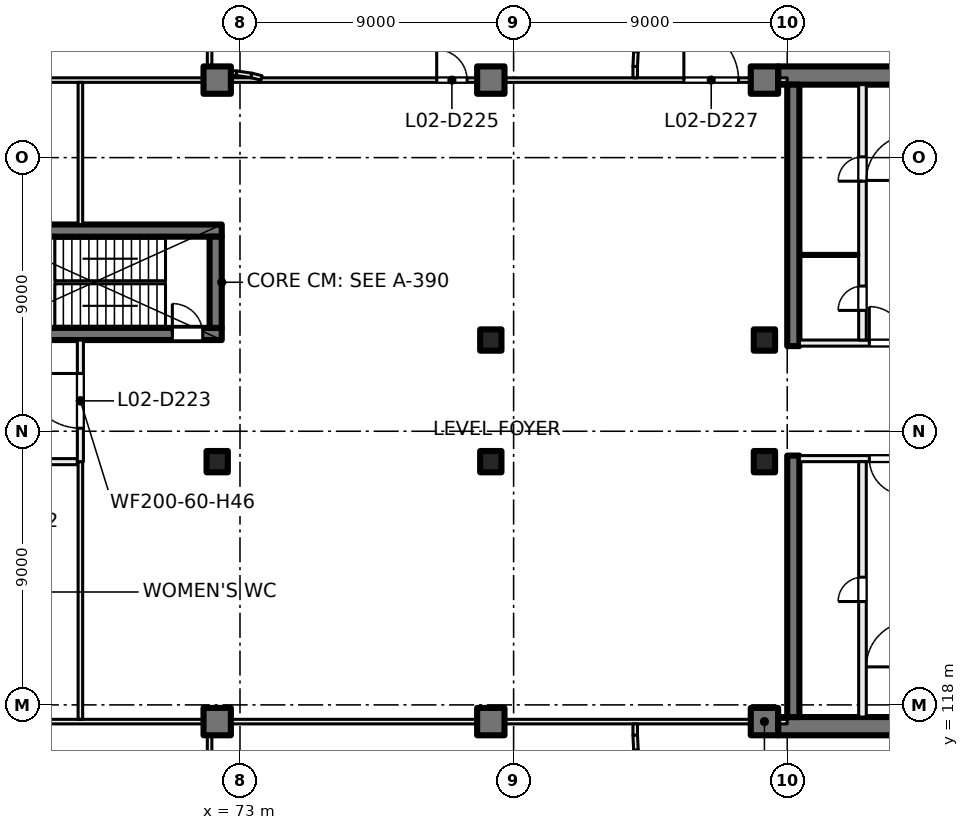
"""IFC4 building model, lengths in metres.
Left out: names, types, materials, properties, quantities, classifications, styles, units other than length and angle.
Written with IfcOpenShell. Run it as: python <this file> out.ifc"""

import sys

from ifc_helpers import new_model, si_unit, direction, frame, frame_2d, origin, origin_2d, place, context, subcontext, project, spatial, rectangle, extrude, element, fill, save


model = new_model("IFC4")
c1 = context("Model", 3, precision=1e-05, world=origin(), true_north=direction((0.0, 1.0)))
c2 = subcontext(c1, "Body", "Model", "MODEL_VIEW")
j1 = project(units=[si_unit("LENGTHUNIT", "METRE"), si_unit("PLANEANGLEUNIT", "RADIAN")], contexts=[c1])
p1 = place(None, origin())
s1 = spatial("IfcSite", under=j1, at=p1, CompositionType="ELEMENT")
p2 = place(p1, origin())
s2 = spatial("IfcBuilding", under=s1, at=p2, CompositionType="ELEMENT")
p3 = place(p2, frame((0.0, 0.0, 12.5)))
s3 = spatial("IfcBuildingStorey", under=s2, at=p3, CompositionType="ELEMENT", Elevation=12.5)
for number, where, z_axis, x_axis in (
    (1, (81.25, 130.0, 0.0), (0.0, 0.0, 1.0), (1.0, 0.0, 0.0)),
    (2, (90.25, 130.0, 0.0), (0.0, 0.0, 1.0), (1.0, 0.0, 0.0)),
    (3, (72.25, 126.0, 0.0), (0.0, 0.0, 1.0), (1.0, 0.0, 0.0)),
    (4, (81.25, 126.0, 0.0), (0.0, 0.0, 1.0), (1.0, 0.0, 0.0)),
    (5, (90.25, 126.0, 0.0), (0.0, 0.0, 1.0), (1.0, 0.0, 0.0)),
):
    element("IfcColumn", number, at=place(p3, frame(where, z_axis=z_axis, x_axis=x_axis)), inside=s3, PredefinedType="COLUMN", context=c2, shape_type="SweptSolid", body=[
        extrude(rectangle(XDim=0.7, YDim=0.7, at=origin_2d()), origin(), (0.0, 0.0, 1.0), 5.0),
    ])
for number, where, z_axis, x_axis in (
    (6, (72.25, 138.55, 0.0), (0.0, 0.0, 1.0), (1.0, 0.0, 0.0)),
    (7, (81.25, 138.55, 0.0), (0.0, 0.0, 1.0), (1.0, 0.0, 0.0)),
    (8, (90.25, 138.55, 0.0), (0.0, 0.0, 1.0), (1.0, 0.0, 0.0)),
    (9, (72.25, 117.45, 0.0), (0.0, 0.0, 1.0), (1.0, 0.0, 0.0)),
    (10, (81.25, 117.45, 0.0), (0.0, 0.0, 1.0), (1.0, 0.0, 0.0)),
    (11, (90.25, 117.45, 0.0), (0.0, 0.0, 1.0), (1.0, 0.0, 0.0)),
):
    element("IfcColumn", number, at=place(p3, frame(where, z_axis=z_axis, x_axis=x_axis)), inside=s3, PredefinedType="COLUMN", context=c2, shape_type="SweptSolid", body=[
        extrude(rectangle(XDim=0.9, YDim=0.9, at=origin_2d()), origin(), (0.0, 0.0, 1.0), 5.0),
    ])
for number, where, z_axis, x_axis in (
    (12, (99.6, 138.7, 0.0), (0.0, 0.0, 1.0), (-1.0, 0.0, 0.0)),
    (13, (99.6, 117.3, 0.0), (0.0, 0.0, 1.0), (-1.0, 0.0, 0.0)),
):
    element("IfcWall", number, at=place(p3, frame(where, z_axis=z_axis, x_axis=x_axis)), inside=s3, PredefinedType="SHEAR", context=c2, shape_type="SweptSolid", body=[
        extrude(rectangle(XDim=8.9, YDim=0.6, at=frame_2d((4.45, 0.0))), origin(), (0.0, 0.0, 1.0), 5.0),
    ])
for number, where, z_axis, x_axis in (
    (14, (91.2, 138.4, 0.0), (0.0, 0.0, 1.0), (0.0, -1.0, 0.0)),
    (15, (91.2, 126.2, 0.0), (0.0, 0.0, 1.0), (0.0, -1.0, 0.0)),
):
    element("IfcWall", number, at=place(p3, frame(where, z_axis=z_axis, x_axis=x_axis)), inside=s3, PredefinedType="SHEAR", context=c2, shape_type="SweptSolid", body=[
        extrude(rectangle(XDim=8.6, YDim=0.4, at=frame_2d((4.3, 0.0))), origin(), (0.0, 0.0, 1.0), 5.0),
    ])
p4 = place(p3, frame((63.6, 130.2, 0.0), z_axis=(0.0, 0.0, 1.0), x_axis=(1.0, 0.0, 0.0)))
e16 = element("IfcWall", 16, at=p4, inside=s3, PredefinedType="SHEAR", context=c2, shape_type="SweptSolid", body=[
    extrude(rectangle(XDim=8.8, YDim=0.4, at=frame_2d((4.4, 0.0))), origin(), (0.0, 0.0, 1.0), 5.0),
])
p5 = place(p4, frame((7.175, 0.0, 0.0)))
e17 = element("IfcOpeningElement", 17, at=p5, cuts=e16, PredefinedType="OPENING", context=c2, shape_type="SweptSolid", body=[
    extrude(rectangle(XDim=1.0, YDim=2.1, at=frame_2d((0.5, 1.05))), frame((0.0, 0.21, 0.0), z_axis=(0.0, -1.0, 0.0), x_axis=(1.0, 0.0, 0.0)), (0.0, 0.0, 1.0), 0.42),
])
p6 = place(p3, frame((64.0, 133.6, 0.0), z_axis=(0.0, 0.0, 1.0), x_axis=(1.0, 0.0, 0.0)))
e18 = element("IfcWall", 18, at=p6, inside=s3, PredefinedType="SHEAR", context=c2, shape_type="SweptSolid", body=[
    extrude(rectangle(XDim=8.4, YDim=0.4, at=frame_2d((4.2, 0.0))), origin(), (0.0, 0.0, 1.0), 5.0),
])
p7 = place(p3, frame((72.2, 130.4, 0.0), z_axis=(0.0, 0.0, 1.0), x_axis=(0.0, 1.0, 0.0)))
e19 = element("IfcWall", 19, at=p7, inside=s3, PredefinedType="SHEAR", context=c2, shape_type="SweptSolid", body=[
    extrude(rectangle(XDim=3.0, YDim=0.4, at=frame_2d((1.5, 0.0))), origin(), (0.0, 0.0, 1.0), 5.0),
])
p8 = place(p3, frame((95.2, 126.1, 0.0), z_axis=(0.0, 0.0, 1.0), x_axis=(-1.0, 0.0, 0.0)))
e20 = element("IfcWall", 20, at=p8, inside=s3, PredefinedType="PARTITIONING", context=c2, shape_type="SweptSolid", body=[
    extrude(rectangle(XDim=3.8, YDim=0.2, at=frame_2d((1.9, 0.0))), origin(), (0.0, 0.0, 1.0), 4.6),
])
p9 = place(p8, frame((0.3, 0.0, 0.0)))
e21 = element("IfcOpeningElement", 21, at=p9, cuts=e20, PredefinedType="OPENING", context=c2, shape_type="SweptSolid", body=[
    extrude(rectangle(XDim=1.2, YDim=2.1, at=frame_2d((0.6, 1.05))), frame((0.0, 0.11, 0.0), z_axis=(0.0, -1.0, 0.0), x_axis=(1.0, 0.0, 0.0)), (0.0, 0.0, 1.0), 0.22),
])
p10 = place(p3, frame((93.475, 117.6, 0.0), z_axis=(0.0, 0.0, 1.0), x_axis=(0.0, 1.0, 0.0)))
e22 = element("IfcWall", 22, at=p10, inside=s3, PredefinedType="PARTITIONING", context=c2, shape_type="SweptSolid", body=[
    extrude(rectangle(XDim=8.4, YDim=0.25, at=frame_2d((4.2, 0.0))), origin(), (0.0, 0.0, 1.0), 4.6),
])
p11 = place(p10, frame((3.8, 0.0, 0.0)))
e23 = element("IfcOpeningElement", 23, at=p11, cuts=e22, PredefinedType="OPENING", context=c2, shape_type="SweptSolid", body=[
    extrude(rectangle(XDim=0.8, YDim=2.1, at=frame_2d((0.4, 1.05))), frame((0.0, 0.135, 0.0), z_axis=(0.0, -1.0, 0.0), x_axis=(1.0, 0.0, 0.0)), (0.0, 0.0, 1.0), 0.27),
])
p12 = place(p3, frame((91.4, 129.9, 0.0), z_axis=(0.0, 0.0, 1.0), x_axis=(1.0, 0.0, 0.0)))
e24 = element("IfcWall", 24, at=p12, inside=s3, PredefinedType="PARTITIONING", context=c2, shape_type="SweptSolid", body=[
    extrude(rectangle(XDim=3.8, YDim=0.2, at=frame_2d((1.9, 0.0))), origin(), (0.0, 0.0, 1.0), 4.6),
])
p13 = place(p12, frame((2.3, 0.0, 0.0)))
e25 = element("IfcOpeningElement", 25, at=p13, cuts=e24, PredefinedType="OPENING", context=c2, shape_type="SweptSolid", body=[
    extrude(rectangle(XDim=1.2, YDim=2.1, at=frame_2d((0.6, 1.05))), frame((0.0, 0.11, 0.0), z_axis=(0.0, -1.0, 0.0), x_axis=(1.0, 0.0, 0.0)), (0.0, 0.0, 1.0), 0.22),
])
p14 = place(p3, frame((93.475, 130.0, 0.0), z_axis=(0.0, 0.0, 1.0), x_axis=(0.0, 1.0, 0.0)))
e26 = element("IfcWall", 26, at=p14, inside=s3, PredefinedType="PARTITIONING", context=c2, shape_type="SweptSolid", body=[
    extrude(rectangle(XDim=8.4, YDim=0.25, at=frame_2d((4.2, 0.0))), origin(), (0.0, 0.0, 1.0), 4.6),
])
p15 = place(p14, frame((0.975, 0.0, 0.0)))
e27 = element("IfcOpeningElement", 27, at=p15, cuts=e26, PredefinedType="OPENING", context=c2, shape_type="SweptSolid", body=[
    extrude(rectangle(XDim=0.8, YDim=2.1, at=frame_2d((0.4, 1.05))), frame((0.0, 0.135, 0.0), z_axis=(0.0, -1.0, 0.0), x_axis=(1.0, 0.0, 0.0)), (0.0, 0.0, 1.0), 0.27),
])
p16 = place(p14, frame((5.225, 0.0, 0.0)))
e28 = element("IfcOpeningElement", 28, at=p16, cuts=e26, PredefinedType="OPENING", context=c2, shape_type="SweptSolid", body=[
    extrude(rectangle(XDim=0.8, YDim=2.1, at=frame_2d((0.4, 1.05))), frame((0.0, 0.135, 0.0), z_axis=(0.0, -1.0, 0.0), x_axis=(1.0, 0.0, 0.0)), (0.0, 0.0, 1.0), 0.27),
])
p17 = place(p3, frame((91.4, 132.8, 0.0), z_axis=(0.0, 0.0, 1.0), x_axis=(1.0, 0.0, 0.0)))
e29 = element("IfcWall", 29, at=p17, inside=s3, PredefinedType="PARTITIONING", context=c2, shape_type="SweptSolid", body=[
    extrude(rectangle(XDim=1.95, YDim=0.1, at=frame_2d((0.975, 0.0))), origin(), (0.0, 0.0, 1.0), 4.6),
])
p18 = place(p3, frame((49.825, 117.45, 0.0), z_axis=(0.0, 0.0, 1.0), x_axis=(1.0, 0.0, 0.0)))
e30 = element("IfcWall", 30, at=p18, inside=s3, PredefinedType="PARTITIONING", context=c2, shape_type="SweptSolid", body=[
    extrude(rectangle(XDim=41.175, YDim=0.15, at=frame_2d((20.587, 0.0))), origin(), (0.0, 0.0, 1.0), 4.6),
])
p19 = place(p3, frame((67.65, 126.0, 0.0), z_axis=(0.0, 0.0, 1.0), x_axis=(-1.0, 0.0, 0.0)))
e31 = element("IfcWall", 31, at=p19, inside=s3, PredefinedType="PARTITIONING", context=c2, shape_type="SweptSolid", body=[
    extrude(rectangle(XDim=17.8, YDim=0.2, at=frame_2d((8.9, 0.0))), origin(), (0.0, 0.0, 1.0), 4.6),
])
p20 = place(p19, frame((11.998, 0.0, 0.0)))
e32 = element("IfcOpeningElement", 32, at=p20, cuts=e31, PredefinedType="OPENING", context=c2, shape_type="SweptSolid", body=[
    extrude(rectangle(XDim=1.0, YDim=2.1, at=frame_2d((0.5, 1.05))), frame((0.0, 0.11, 0.0), z_axis=(0.0, -1.0, 0.0), x_axis=(1.0, 0.0, 0.0)), (0.0, 0.0, 1.0), 0.22),
])
p21 = place(p19, frame((6.15, 0.0, 0.0)))
e33 = element("IfcOpeningElement", 33, at=p21, cuts=e31, PredefinedType="OPENING", context=c2, shape_type="SweptSolid", body=[
    extrude(rectangle(XDim=1.0, YDim=2.1, at=frame_2d((0.5, 1.05))), frame((0.0, 0.11, 0.0), z_axis=(0.0, -1.0, 0.0), x_axis=(1.0, 0.0, 0.0)), (0.0, 0.0, 1.0), 0.22),
])
p22 = place(p19, frame((1.652, 0.0, 0.0)))
e34 = element("IfcOpeningElement", 34, at=p22, cuts=e31, PredefinedType="OPENING", context=c2, shape_type="SweptSolid", body=[
    extrude(rectangle(XDim=1.0, YDim=2.1, at=frame_2d((0.5, 1.05))), frame((0.0, 0.11, 0.0), z_axis=(0.0, -1.0, 0.0), x_axis=(1.0, 0.0, 0.0)), (0.0, 0.0, 1.0), 0.22),
])
p23 = place(p3, frame((49.825, 138.55, 0.0), z_axis=(0.0, 0.0, 1.0), x_axis=(1.0, 0.0, 0.0)))
e35 = element("IfcWall", 35, at=p23, inside=s3, PredefinedType="PARTITIONING", context=c2, shape_type="SweptSolid", body=[
    extrude(rectangle(XDim=41.175, YDim=0.15, at=frame_2d((20.587, 0.0))), origin(), (0.0, 0.0, 1.0), 4.6),
])
p24 = place(p23, frame((29.645, 0.0, 0.0)))
e36 = element("IfcOpeningElement", 36, at=p24, cuts=e35, PredefinedType="OPENING", context=c2, shape_type="SweptSolid", body=[
    extrude(rectangle(XDim=1.0, YDim=2.1, at=frame_2d((0.5, 1.05))), frame((0.0, 0.085, 0.0), z_axis=(0.0, -1.0, 0.0), x_axis=(1.0, 0.0, 0.0)), (0.0, 0.0, 1.0), 0.17),
])
p25 = place(p23, frame((37.775, 0.0, 0.0)))
e37 = element("IfcOpeningElement", 37, at=p25, cuts=e35, PredefinedType="OPENING", context=c2, shape_type="SweptSolid", body=[
    extrude(rectangle(XDim=1.8, YDim=2.1, at=frame_2d((0.9, 1.05))), frame((0.0, 0.085, 0.0), z_axis=(0.0, -1.0, 0.0), x_axis=(1.0, 0.0, 0.0)), (0.0, 0.0, 1.0), 0.17),
])
p26 = place(p3, frame((67.75, 117.525, 0.0), z_axis=(0.0, 0.0, 1.0), x_axis=(0.0, 1.0, 0.0)))
e38 = element("IfcWall", 38, at=p26, inside=s3, PredefinedType="PARTITIONING", context=c2, shape_type="SweptSolid", body=[
    extrude(rectangle(XDim=8.475, YDim=0.15, at=frame_2d((4.238, 0.0))), origin(), (0.0, 0.0, 1.0), 4.6),
])
p27 = place(p3, frame((67.75, 130.0, 0.0), z_axis=(0.0, 0.0, 1.0), x_axis=(0.0, -1.0, 0.0)))
e39 = element("IfcWall", 39, at=p27, inside=s3, PredefinedType="PARTITIONING", context=c2, shape_type="SweptSolid", body=[
    extrude(rectangle(XDim=4.0, YDim=0.2, at=frame_2d((2.0, 0.0))), origin(), (0.0, 0.0, 1.0), 4.6),
])
p28 = place(p27, frame((1.1, 0.0, 0.0)))
e40 = element("IfcOpeningElement", 40, at=p28, cuts=e39, PredefinedType="OPENING", context=c2, shape_type="SweptSolid", body=[
    extrude(rectangle(XDim=1.8, YDim=2.1, at=frame_2d((0.9, 1.05))), frame((0.0, 0.11, 0.0), z_axis=(0.0, -1.0, 0.0), x_axis=(1.0, 0.0, 0.0)), (0.0, 0.0, 1.0), 0.22),
])
p29 = place(p3, frame((67.75, 133.8, 0.0), z_axis=(0.0, 0.0, 1.0), x_axis=(0.0, 1.0, 0.0)))
e41 = element("IfcWall", 41, at=p29, inside=s3, PredefinedType="PARTITIONING", context=c2, shape_type="SweptSolid", body=[
    extrude(rectangle(XDim=4.675, YDim=0.15, at=frame_2d((2.337, 0.0))), origin(), (0.0, 0.0, 1.0), 4.6),
])
p30 = place(p3, frame((72.0, 109.075, 0.0), z_axis=(0.0, 0.0, 1.0), x_axis=(0.0, 1.0, 0.0)))
e42 = element("IfcWall", 42, at=p30, inside=s3, PredefinedType="PARTITIONING", context=c2, shape_type="SweptSolid", body=[
    extrude(rectangle(XDim=8.3, YDim=0.15, at=frame_2d((4.15, 0.0))), origin(), (0.0, 0.0, 1.0), 4.6),
])
p31 = place(p3, frame((72.0, 138.725, 0.0), z_axis=(0.0, 0.0, 1.0), x_axis=(0.0, 1.0, 0.0)))
e43 = element("IfcWall", 43, at=p31, inside=s3, PredefinedType="PARTITIONING", context=c2, shape_type="SweptSolid", body=[
    extrude(rectangle(XDim=5.35, YDim=0.15, at=frame_2d((2.675, 0.0))), origin(), (0.0, 0.0, 1.0), 4.6),
])
p32 = place(p3, frame((72.075, 138.8, 0.0), z_axis=(0.0, 0.0, 1.0), x_axis=(1.0, 0.0, 0.0)))
e44 = element("IfcWall", 44, at=p32, inside=s3, PredefinedType="PARTITIONING", context=c2, shape_type="SweptSolid", body=[
    extrude(rectangle(XDim=0.327, YDim=0.15, at=frame_2d((0.164, 0.0))), origin(), (0.0, 0.0, 1.0), 4.6),
])
p33 = place(p3, frame((72.398, 138.8, 0.0), z_axis=(0.0, 0.0, 1.0), x_axis=(0.998815266503, -0.048662751665, 0.0)))
e45 = element("IfcWall", 45, at=p33, inside=s3, PredefinedType="PARTITIONING", context=c2, shape_type="SweptSolid", body=[
    extrude(rectangle(XDim=0.497, YDim=0.15, at=frame_2d((0.248, 0.0))), origin(), (0.0, 0.0, 1.0), 4.6),
])
p34 = place(p3, frame((72.886, 138.777, 0.0), z_axis=(0.0, 0.0, 1.0), x_axis=(0.988853572557, -0.148891275908, 0.0)))
e46 = element("IfcWall", 46, at=p34, inside=s3, PredefinedType="PARTITIONING", context=c2, shape_type="SweptSolid", body=[
    extrude(rectangle(XDim=0.499, YDim=0.15, at=frame_2d((0.249, 0.0))), origin(), (0.0, 0.0, 1.0), 4.6),
])
p35 = place(p3, frame((73.371, 138.705, 0.0), z_axis=(0.0, 0.0, 1.0), x_axis=(0.969811847647, -0.243854424119, 0.0)))
e47 = element("IfcWall", 47, at=p35, inside=s3, PredefinedType="PARTITIONING", context=c2, shape_type="SweptSolid", body=[
    extrude(rectangle(XDim=0.348, YDim=0.15, at=frame_2d((0.174, 0.0))), origin(), (0.0, 0.0, 1.0), 4.6),
])
p36 = place(p3, frame((86.0, 116.998, 0.0), z_axis=(0.0, 0.0, 1.0), x_axis=(0.0, 1.0, 0.0)))
e48 = element("IfcWall", 48, at=p36, inside=s3, PredefinedType="PARTITIONING", context=c2, shape_type="SweptSolid", body=[
    extrude(rectangle(XDim=0.377, YDim=0.15, at=frame_2d((0.188, 0.0))), origin(), (0.0, 0.0, 1.0), 4.6),
])
p37 = place(p3, frame((86.0, 117.002, 0.0), z_axis=(0.0, 0.0, 1.0), x_axis=(0.048196018647, -0.998837896651, 0.0)))
e49 = element("IfcWall", 49, at=p37, inside=s3, PredefinedType="PARTITIONING", context=c2, shape_type="SweptSolid", body=[
    extrude(rectangle(XDim=0.496, YDim=0.15, at=frame_2d((0.248, 0.0))), origin(), (0.0, 0.0, 1.0), 4.6),
])
p38 = place(p3, frame((86.0, 138.625, 0.0), z_axis=(0.0, 0.0, 1.0), x_axis=(0.0, 1.0, 0.0)))
e50 = element("IfcWall", 50, at=p38, inside=s3, PredefinedType="PARTITIONING", context=c2, shape_type="SweptSolid", body=[
    extrude(rectangle(XDim=0.377, YDim=0.15, at=frame_2d((0.188, 0.0))), origin(), (0.0, 0.0, 1.0), 4.6),
])
p39 = place(p3, frame((86.0, 138.998, 0.0), z_axis=(0.0, 0.0, 1.0), x_axis=(0.048196018647, 0.998837896651, 0.0)))
e51 = element("IfcWall", 51, at=p39, inside=s3, PredefinedType="PARTITIONING", context=c2, shape_type="SweptSolid", body=[
    extrude(rectangle(XDim=0.496, YDim=0.15, at=frame_2d((0.248, 0.0))), origin(), (0.0, 0.0, 1.0), 4.6),
])
p40 = place(p3, frame((86.023, 139.486, 0.0), z_axis=(0.0, 0.0, 1.0), x_axis=(0.148412307247, 0.988925572052, 0.0)))
e52 = element("IfcWall", 52, at=p40, inside=s3, PredefinedType="PARTITIONING", context=c2, shape_type="SweptSolid", body=[
    extrude(rectangle(XDim=0.499, YDim=0.15, at=frame_2d((0.249, 0.0))), origin(), (0.0, 0.0, 1.0), 4.6),
])
p41 = place(p9, origin())
e53 = element("IfcDoor", 53, at=p41, inside=s3, OperationType="DOUBLE_DOOR_SINGLE_SWING", PredefinedType="DOOR", context=c2, shape_type="SweptSolid", body=[
    extrude(rectangle(XDim=1.2, YDim=2.1, at=frame_2d((0.6, 1.05))), frame((0.0, 0.025, 0.0), z_axis=(0.0, -1.0, 0.0), x_axis=(1.0, 0.0, 0.0)), (0.0, 0.0, 1.0), 0.05),
])
fill(e21, e53)
p42 = place(p11, origin())
e54 = element("IfcDoor", 54, at=p42, inside=s3, OperationType="SINGLE_SWING_LEFT", PredefinedType="DOOR", context=c2, shape_type="SweptSolid", body=[
    extrude(rectangle(XDim=0.8, YDim=2.1, at=frame_2d((0.4, 1.05))), frame((0.0, 0.025, 0.0), z_axis=(0.0, -1.0, 0.0), x_axis=(1.0, 0.0, 0.0)), (0.0, 0.0, 1.0), 0.05),
])
fill(e23, e54)
p43 = place(p13, origin())
e55 = element("IfcDoor", 55, at=p43, inside=s3, OperationType="DOUBLE_DOOR_SINGLE_SWING", PredefinedType="DOOR", context=c2, shape_type="SweptSolid", body=[
    extrude(rectangle(XDim=1.2, YDim=2.1, at=frame_2d((0.6, 1.05))), frame((0.0, 0.025, 0.0), z_axis=(0.0, -1.0, 0.0), x_axis=(1.0, 0.0, 0.0)), (0.0, 0.0, 1.0), 0.05),
])
fill(e25, e55)
p44 = place(p15, origin())
e56 = element("IfcDoor", 56, at=p44, inside=s3, OperationType="SINGLE_SWING_RIGHT", PredefinedType="DOOR", context=c2, shape_type="SweptSolid", body=[
    extrude(rectangle(XDim=0.8, YDim=2.1, at=frame_2d((0.4, 1.05))), frame((0.0, 0.025, 0.0), z_axis=(0.0, -1.0, 0.0), x_axis=(1.0, 0.0, 0.0)), (0.0, 0.0, 1.0), 0.05),
])
fill(e27, e56)
p45 = place(p16, origin())
e57 = element("IfcDoor", 57, at=p45, inside=s3, OperationType="SINGLE_SWING_LEFT", PredefinedType="DOOR", context=c2, shape_type="SweptSolid", body=[
    extrude(rectangle(XDim=0.8, YDim=2.1, at=frame_2d((0.4, 1.05))), frame((0.0, 0.025, 0.0), z_axis=(0.0, -1.0, 0.0), x_axis=(1.0, 0.0, 0.0)), (0.0, 0.0, 1.0), 0.05),
])
fill(e28, e57)
p46 = place(p5, origin())
e58 = element("IfcDoor", 58, at=p46, inside=s3, OperationType="SINGLE_SWING_LEFT", PredefinedType="DOOR", context=c2, shape_type="SweptSolid", body=[
    extrude(rectangle(XDim=1.0, YDim=2.1, at=frame_2d((0.5, 1.05))), frame((0.0, 0.025, 0.0), z_axis=(0.0, -1.0, 0.0), x_axis=(1.0, 0.0, 0.0)), (0.0, 0.0, 1.0), 0.05),
])
fill(e17, e58)
p47 = place(p28, origin())
e59 = element("IfcDoor", 59, at=p47, inside=s3, OperationType="DOUBLE_DOOR_SINGLE_SWING", PredefinedType="DOOR", context=c2, shape_type="SweptSolid", body=[
    extrude(rectangle(XDim=1.8, YDim=2.1, at=frame_2d((0.9, 1.05))), frame((0.0, 0.025, 0.0), z_axis=(0.0, -1.0, 0.0), x_axis=(1.0, 0.0, 0.0)), (0.0, 0.0, 1.0), 0.05),
])
fill(e40, e59)
p48 = place(p24, origin())
e60 = element("IfcDoor", 60, at=p48, inside=s3, OperationType="SINGLE_SWING_LEFT", PredefinedType="DOOR", context=c2, shape_type="SweptSolid", body=[
    extrude(rectangle(XDim=1.0, YDim=2.1, at=frame_2d((0.5, 1.05))), frame((0.0, 0.025, 0.0), z_axis=(0.0, -1.0, 0.0), x_axis=(1.0, 0.0, 0.0)), (0.0, 0.0, 1.0), 0.05),
])
fill(e36, e60)
p49 = place(p25, origin())
e61 = element("IfcDoor", 61, at=p49, inside=s3, OperationType="DOUBLE_DOOR_SINGLE_SWING", PredefinedType="DOOR", context=c2, shape_type="SweptSolid", body=[
    extrude(rectangle(XDim=1.8, YDim=2.1, at=frame_2d((0.9, 1.05))), frame((0.0, 0.025, 0.0), z_axis=(0.0, -1.0, 0.0), x_axis=(1.0, 0.0, 0.0)), (0.0, 0.0, 1.0), 0.05),
])
fill(e37, e61)
save(model, sys.argv[1])
